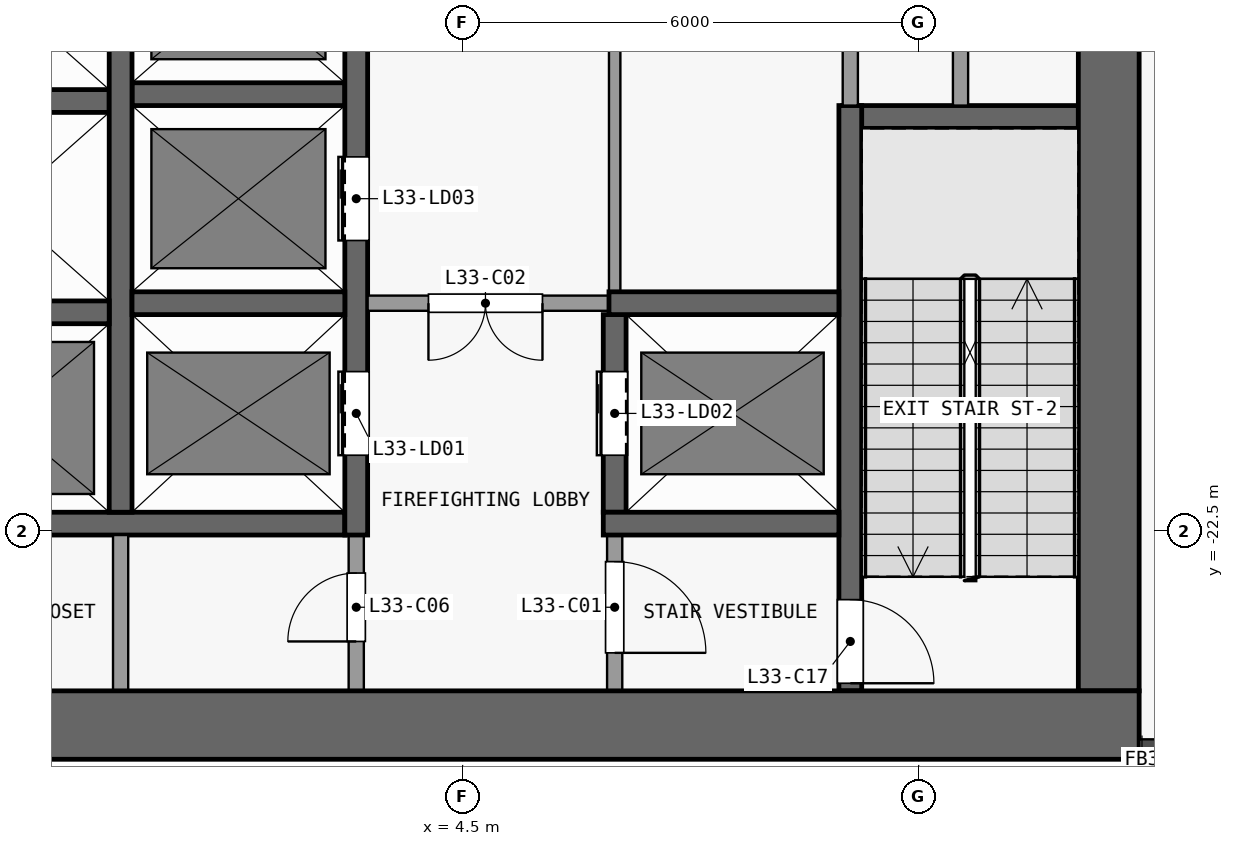
"""IFC4 building model, lengths in metres.
Left out: names, types, materials, properties, quantities, classifications, styles, units other than length and angle.
Written with IfcOpenShell. Run it as: python <this file> out.ifc"""

import sys

from ifc_helpers import new_model, si_unit, direction, frame, frame_2d, origin, place, context, subcontext, project, spatial, rectangle, extrude, element, fill, save


model = new_model("IFC4")
c1 = context("Model", 3, precision=1e-05, world=origin(), true_north=direction((0.0, 1.0)))
c2 = subcontext(c1, "Body", "Model", "MODEL_VIEW")
j1 = project(units=[si_unit("LENGTHUNIT", "METRE"), si_unit("PLANEANGLEUNIT", "RADIAN")], contexts=[c1])
p1 = place(None, origin())
s1 = spatial("IfcSite", under=j1, at=p1, CompositionType="ELEMENT")
p2 = place(p1, origin())
s2 = spatial("IfcBuilding", under=s1, at=p2, CompositionType="ELEMENT")
p3 = place(p2, frame((0.0, 0.0, 133.9)))
s3 = spatial("IfcBuildingStorey", under=s2, at=p3, CompositionType="ELEMENT", Elevation=133.9)
p4 = place(p3, frame((-13.4, -25.05, 0.0), z_axis=(0.0, 0.0, 1.0), x_axis=(1.0, 0.0, 0.0)))
e1 = element("IfcWall", 1, at=p4, inside=s3, PredefinedType="SHEAR", context=c2, shape_type="SweptSolid", body=[
    extrude(rectangle(XDim=26.8, YDim=0.9, at=frame_2d((13.4, 0.0))), origin(), (0.0, 0.0, 1.0), 4.7),
])
p5 = place(p3, frame((13.0, -24.6, 0.0), z_axis=(0.0, 0.0, 1.0), x_axis=(0.0, 1.0, 0.0)))
e2 = element("IfcWall", 2, at=p5, inside=s3, PredefinedType="SHEAR", context=c2, shape_type="SweptSolid", body=[
    extrude(rectangle(XDim=16.1, YDim=0.8, at=frame_2d((8.05, 0.0))), origin(), (0.0, 0.0, 1.0), 4.7),
])
p6 = place(p3, frame((-2.95, -22.4, 0.0), z_axis=(0.0, 0.0, 1.0), x_axis=(1.0, 0.0, 0.0)))
e3 = element("IfcWall", 3, at=p6, inside=s3, PredefinedType="SHEAR", context=c2, shape_type="SweptSolid", body=[
    extrude(rectangle(XDim=5.9, YDim=0.3, at=frame_2d((2.95, 0.0))), origin(), (0.0, 0.0, 1.0), 4.7),
])
p7 = place(p3, frame((6.35, -22.4, 0.0), z_axis=(0.0, 0.0, 1.0), x_axis=(1.0, 0.0, 0.0)))
e4 = element("IfcWall", 4, at=p7, inside=s3, PredefinedType="SHEAR", context=c2, shape_type="SweptSolid", body=[
    extrude(rectangle(XDim=3.1, YDim=0.3, at=frame_2d((1.55, 0.0))), origin(), (0.0, 0.0, 1.0), 4.7),
])
for number, where, z_axis, x_axis in (
    (5, (-2.95, -19.62, 0.0), (0.0, 0.0, 1.0), (1.0, 0.0, 0.0)),
    (6, (0.15, -19.5, 0.0), (0.0, 0.0, 1.0), (1.0, 0.0, 0.0)),
):
    element("IfcWall", number, at=place(p3, frame(where, z_axis=z_axis, x_axis=x_axis)), inside=s3, PredefinedType="SHEAR", context=c2, shape_type="SweptSolid", body=[
        extrude(rectangle(XDim=2.8, YDim=0.3, at=frame_2d((1.4, 0.0))), origin(), (0.0, 0.0, 1.0), 4.7),
    ])
p8 = place(p3, frame((6.575, -19.5, 0.0), z_axis=(0.0, 0.0, 1.0), x_axis=(-1.0, 0.0, 0.0)))
e7 = element("IfcWall", 7, at=p8, inside=s3, PredefinedType="PARTITIONING", context=c2, shape_type="SweptSolid", body=[
    extrude(rectangle(XDim=3.325, YDim=0.2, at=frame_2d((1.663, 0.0))), origin(), (0.0, 0.0, 1.0), 4.7),
])
p9 = place(p8, frame((1.025, 0.0, 0.0)))
e8 = element("IfcOpeningElement", 8, at=p9, cuts=e7, PredefinedType="OPENING", context=c2, shape_type="SweptSolid", body=[
    extrude(rectangle(XDim=1.5, YDim=2.1, at=frame_2d((0.75, 1.05))), frame((0.0, 0.11, 0.0), z_axis=(0.0, -1.0, 0.0), x_axis=(1.0, 0.0, 0.0)), (0.0, 0.0, 1.0), 0.22),
])
p10 = place(p3, frame((6.425, -19.5, 0.0), z_axis=(0.0, 0.0, 1.0), x_axis=(1.0, 0.0, 0.0)))
e9 = element("IfcWall", 9, at=p10, inside=s3, PredefinedType="SHEAR", context=c2, shape_type="SweptSolid", body=[
    extrude(rectangle(XDim=3.025, YDim=0.3, at=frame_2d((1.512, 0.0))), origin(), (0.0, 0.0, 1.0), 4.7),
])
p11 = place(p3, frame((9.5, -17.05, 0.0), z_axis=(0.0, 0.0, 1.0), x_axis=(1.0, 0.0, 0.0)))
e10 = element("IfcWall", 10, at=p11, inside=s3, PredefinedType="SHEAR", context=c2, shape_type="SweptSolid", body=[
    extrude(rectangle(XDim=3.1, YDim=0.3, at=frame_2d((1.55, 0.0))), origin(), (0.0, 0.0, 1.0), 4.7),
])
for number, where, z_axis, x_axis in (
    (11, (-2.95, -16.84, 0.0), (0.0, 0.0, 1.0), (1.0, 0.0, 0.0)),
    (12, (0.15, -16.75, 0.0), (0.0, 0.0, 1.0), (1.0, 0.0, 0.0)),
):
    element("IfcWall", number, at=place(p3, frame(where, z_axis=z_axis, x_axis=x_axis)), inside=s3, PredefinedType="SHEAR", context=c2, shape_type="SweptSolid", body=[
        extrude(rectangle(XDim=2.8, YDim=0.3, at=frame_2d((1.4, 0.0))), origin(), (0.0, 0.0, 1.0), 4.7),
    ])
p12 = place(p3, frame((0.0, -24.6, 0.0), z_axis=(0.0, 0.0, 1.0), x_axis=(0.0, 1.0, 0.0)))
e13 = element("IfcWall", 13, at=p12, inside=s3, PredefinedType="PARTITIONING", context=c2, shape_type="SweptSolid", body=[
    extrude(rectangle(XDim=2.05, YDim=0.2, at=frame_2d((1.025, 0.0))), origin(), (0.0, 0.0, 1.0), 4.7),
])
p13 = place(p3, frame((0.0, -22.25, 0.0), z_axis=(0.0, 0.0, 1.0), x_axis=(0.0, 1.0, 0.0)))
e14 = element("IfcWall", 14, at=p13, inside=s3, PredefinedType="SHEAR", context=c2, shape_type="SweptSolid", body=[
    extrude(rectangle(XDim=13.75, YDim=0.3, at=frame_2d((6.875, 0.0))), origin(), (0.0, 0.0, 1.0), 4.7),
])
p14 = place(p3, frame((3.1, -24.6, 0.0), z_axis=(0.0, 0.0, 1.0), x_axis=(0.0, 1.0, 0.0)))
e15 = element("IfcWall", 15, at=p14, inside=s3, PredefinedType="PARTITIONING", context=c2, shape_type="SweptSolid", body=[
    extrude(rectangle(XDim=2.05, YDim=0.2, at=frame_2d((1.025, 0.0))), origin(), (0.0, 0.0, 1.0), 4.7),
])
p15 = place(p14, frame((0.65, 0.0, 0.0)))
e16 = element("IfcOpeningElement", 16, at=p15, cuts=e15, PredefinedType="OPENING", context=c2, shape_type="SweptSolid", body=[
    extrude(rectangle(XDim=0.9, YDim=2.1, at=frame_2d((0.45, 1.05))), frame((0.0, 0.11, 0.0), z_axis=(0.0, -1.0, 0.0), x_axis=(1.0, 0.0, 0.0)), (0.0, 0.0, 1.0), 0.22),
])
p16 = place(p3, frame((3.1, -22.55, 0.0), z_axis=(0.0, 0.0, 1.0), x_axis=(0.0, 1.0, 0.0)))
e17 = element("IfcWall", 17, at=p16, inside=s3, PredefinedType="SHEAR", context=c2, shape_type="SweptSolid", body=[
    extrude(rectangle(XDim=14.05, YDim=0.3, at=frame_2d((7.025, 0.0))), origin(), (0.0, 0.0, 1.0), 4.7),
])
p17 = place(p16, frame((1.05, 0.0, 0.0)))
e18 = element("IfcOpeningElement", 18, at=p17, cuts=e17, PredefinedType="OPENING", context=c2, shape_type="SweptSolid", body=[
    extrude(rectangle(XDim=1.1, YDim=2.1, at=frame_2d((0.55, 1.05))), frame((0.0, 0.16, 0.0), z_axis=(0.0, -1.0, 0.0), x_axis=(1.0, 0.0, 0.0)), (0.0, 0.0, 1.0), 0.32),
])
p18 = place(p16, frame((3.875, 0.0, 0.0)))
e19 = element("IfcOpeningElement", 19, at=p18, cuts=e17, PredefinedType="OPENING", context=c2, shape_type="SweptSolid", body=[
    extrude(rectangle(XDim=1.1, YDim=2.1, at=frame_2d((0.55, 1.05))), frame((0.0, 0.16, 0.0), z_axis=(0.0, -1.0, 0.0), x_axis=(1.0, 0.0, 0.0)), (0.0, 0.0, 1.0), 0.32),
])
p19 = place(p16, frame((6.625, 0.0, 0.0)))
e20 = element("IfcOpeningElement", 20, at=p19, cuts=e17, PredefinedType="OPENING", context=c2, shape_type="SweptSolid", body=[
    extrude(rectangle(XDim=1.1, YDim=2.1, at=frame_2d((0.55, 1.05))), frame((0.0, 0.16, 0.0), z_axis=(0.0, -1.0, 0.0), x_axis=(1.0, 0.0, 0.0)), (0.0, 0.0, 1.0), 0.32),
])
p20 = place(p16, frame((9.375, 0.0, 0.0)))
e21 = element("IfcOpeningElement", 21, at=p20, cuts=e17, PredefinedType="OPENING", context=c2, shape_type="SweptSolid", body=[
    extrude(rectangle(XDim=1.1, YDim=2.1, at=frame_2d((0.55, 1.05))), frame((0.0, 0.16, 0.0), z_axis=(0.0, -1.0, 0.0), x_axis=(1.0, 0.0, 0.0)), (0.0, 0.0, 1.0), 0.32),
])
p21 = place(p16, frame((12.125, 0.0, 0.0)))
e22 = element("IfcOpeningElement", 22, at=p21, cuts=e17, PredefinedType="OPENING", context=c2, shape_type="SweptSolid", body=[
    extrude(rectangle(XDim=1.1, YDim=2.1, at=frame_2d((0.55, 1.05))), frame((0.0, 0.16, 0.0), z_axis=(0.0, -1.0, 0.0), x_axis=(1.0, 0.0, 0.0)), (0.0, 0.0, 1.0), 0.32),
])
p22 = place(p3, frame((6.5, -22.55, 0.0), z_axis=(0.0, 0.0, 1.0), x_axis=(0.0, -1.0, 0.0)))
e23 = element("IfcWall", 23, at=p22, inside=s3, PredefinedType="PARTITIONING", context=c2, shape_type="SweptSolid", body=[
    extrude(rectangle(XDim=2.05, YDim=0.2, at=frame_2d((1.025, 0.0))), origin(), (0.0, 0.0, 1.0), 4.7),
])
p23 = place(p22, frame((0.35, 0.0, 0.0)))
e24 = element("IfcOpeningElement", 24, at=p23, cuts=e23, PredefinedType="OPENING", context=c2, shape_type="SweptSolid", body=[
    extrude(rectangle(XDim=1.2, YDim=2.1, at=frame_2d((0.6, 1.05))), frame((0.0, 0.11, 0.0), z_axis=(0.0, -1.0, 0.0), x_axis=(1.0, 0.0, 0.0)), (0.0, 0.0, 1.0), 0.22),
])
p24 = place(p3, frame((6.5, -22.25, 0.0), z_axis=(0.0, 0.0, 1.0), x_axis=(0.0, 1.0, 0.0)))
e25 = element("IfcWall", 25, at=p24, inside=s3, PredefinedType="SHEAR", context=c2, shape_type="SweptSolid", body=[
    extrude(rectangle(XDim=2.6, YDim=0.3, at=frame_2d((1.3, 0.0))), origin(), (0.0, 0.0, 1.0), 4.7),
])
p25 = place(p24, frame((0.75, 0.0, 0.0)))
e26 = element("IfcOpeningElement", 26, at=p25, cuts=e25, PredefinedType="OPENING", context=c2, shape_type="SweptSolid", body=[
    extrude(rectangle(XDim=1.1, YDim=2.1, at=frame_2d((0.55, 1.05))), frame((0.0, 0.16, 0.0), z_axis=(0.0, -1.0, 0.0), x_axis=(1.0, 0.0, 0.0)), (0.0, 0.0, 1.0), 0.32),
])
p26 = place(p3, frame((6.5, -8.5, 0.0), z_axis=(0.0, 0.0, 1.0), x_axis=(0.0, -1.0, 0.0)))
e27 = element("IfcWall", 27, at=p26, inside=s3, PredefinedType="PARTITIONING", context=c2, shape_type="SweptSolid", body=[
    extrude(rectangle(XDim=10.85, YDim=0.15, at=frame_2d((5.425, 0.0))), origin(), (0.0, 0.0, 1.0), 4.7),
])
p27 = place(p26, frame((6.275, 0.0, 0.0)))
e28 = element("IfcOpeningElement", 28, at=p27, cuts=e27, PredefinedType="OPENING", context=c2, shape_type="SweptSolid", body=[
    extrude(rectangle(XDim=1.2, YDim=2.1, at=frame_2d((0.6, 1.05))), frame((0.0, 0.085, 0.0), z_axis=(0.0, -1.0, 0.0), x_axis=(1.0, 0.0, 0.0)), (0.0, 0.0, 1.0), 0.17),
])
p28 = place(p26, frame((0.925, 0.0, 0.0)))
e29 = element("IfcOpeningElement", 29, at=p28, cuts=e27, PredefinedType="OPENING", context=c2, shape_type="SweptSolid", body=[
    extrude(rectangle(XDim=0.9, YDim=2.1, at=frame_2d((0.45, 1.05))), frame((0.0, 0.085, 0.0), z_axis=(0.0, -1.0, 0.0), x_axis=(1.0, 0.0, 0.0)), (0.0, 0.0, 1.0), 0.17),
])
p29 = place(p3, frame((9.6, -16.9, 0.0), z_axis=(0.0, 0.0, 1.0), x_axis=(0.0, -1.0, 0.0)))
e30 = element("IfcWall", 30, at=p29, inside=s3, PredefinedType="SHEAR", context=c2, shape_type="SweptSolid", body=[
    extrude(rectangle(XDim=7.7, YDim=0.3, at=frame_2d((3.85, 0.0))), origin(), (0.0, 0.0, 1.0), 4.7),
])
p30 = place(p29, frame((6.5, 0.0, 0.0)))
e31 = element("IfcOpeningElement", 31, at=p30, cuts=e30, PredefinedType="OPENING", context=c2, shape_type="SweptSolid", body=[
    extrude(rectangle(XDim=1.1, YDim=2.1, at=frame_2d((0.55, 1.05))), frame((0.0, 0.16, 0.0), z_axis=(0.0, -1.0, 0.0), x_axis=(1.0, 0.0, 0.0)), (0.0, 0.0, 1.0), 0.32),
])
p31 = place(p3, frame((9.6, -16.9, 0.0), z_axis=(0.0, 0.0, 1.0), x_axis=(0.0, 1.0, 0.0)))
e32 = element("IfcWall", 32, at=p31, inside=s3, PredefinedType="PARTITIONING", context=c2, shape_type="SweptSolid", body=[
    extrude(rectangle(XDim=8.4, YDim=0.2, at=frame_2d((4.2, 0.0))), origin(), (0.0, 0.0, 1.0), 4.7),
])
p32 = place(p3, frame((11.05, -11.2, 0.0), z_axis=(0.0, 0.0, 1.0), x_axis=(0.0, -1.0, 0.0)))
e33 = element("IfcWall", 33, at=p32, inside=s3, PredefinedType="PARTITIONING", context=c2, shape_type="SweptSolid", body=[
    extrude(rectangle(XDim=5.7, YDim=0.2, at=frame_2d((2.85, 0.0))), origin(), (0.0, 0.0, 1.0), 4.7),
])
p33 = place(p32, frame((2.525, 0.0, 0.0)))
e34 = element("IfcOpeningElement", 34, at=p33, cuts=e33, PredefinedType="OPENING", context=c2, shape_type="SweptSolid", body=[
    extrude(rectangle(XDim=0.9, YDim=2.1, at=frame_2d((0.45, 1.05))), frame((0.0, 0.11, 0.0), z_axis=(0.0, -1.0, 0.0), x_axis=(1.0, 0.0, 0.0)), (0.0, 0.0, 1.0), 0.22),
])
p34 = place(p17, origin())
e35 = element("IfcDoor", 35, at=p34, inside=s3, OperationType="DOUBLE_DOOR_SLIDING", PredefinedType="DOOR", context=c2, shape_type="SweptSolid", body=[
    extrude(rectangle(XDim=1.1, YDim=2.1, at=frame_2d((0.55, 1.05))), frame((0.0, 0.025, 0.0), z_axis=(0.0, -1.0, 0.0), x_axis=(1.0, 0.0, 0.0)), (0.0, 0.0, 1.0), 0.05),
])
fill(e18, e35)
p35 = place(p25, origin())
e36 = element("IfcDoor", 36, at=p35, inside=s3, OperationType="DOUBLE_DOOR_SLIDING", PredefinedType="DOOR", context=c2, shape_type="SweptSolid", body=[
    extrude(rectangle(XDim=1.1, YDim=2.1, at=frame_2d((0.55, 1.05))), frame((0.0, 0.025, 0.0), z_axis=(0.0, -1.0, 0.0), x_axis=(1.0, 0.0, 0.0)), (0.0, 0.0, 1.0), 0.05),
])
fill(e26, e36)
p36 = place(p18, origin())
e37 = element("IfcDoor", 37, at=p36, inside=s3, OperationType="DOUBLE_DOOR_SLIDING", PredefinedType="DOOR", context=c2, shape_type="SweptSolid", body=[
    extrude(rectangle(XDim=1.1, YDim=2.1, at=frame_2d((0.55, 1.05))), frame((0.0, 0.025, 0.0), z_axis=(0.0, -1.0, 0.0), x_axis=(1.0, 0.0, 0.0)), (0.0, 0.0, 1.0), 0.05),
])
fill(e19, e37)
p37 = place(p23, origin())
e38 = element("IfcDoor", 38, at=p37, inside=s3, OperationType="SINGLE_SWING_RIGHT", PredefinedType="DOOR", context=c2, shape_type="SweptSolid", body=[
    extrude(rectangle(XDim=1.2, YDim=2.1, at=frame_2d((0.6, 1.05))), frame((0.0, 0.025, 0.0), z_axis=(0.0, -1.0, 0.0), x_axis=(1.0, 0.0, 0.0)), (0.0, 0.0, 1.0), 0.05),
])
fill(e24, e38)
p38 = place(p9, origin())
e39 = element("IfcDoor", 39, at=p38, inside=s3, OperationType="DOUBLE_DOOR_SINGLE_SWING", PredefinedType="DOOR", context=c2, shape_type="SweptSolid", body=[
    extrude(rectangle(XDim=1.5, YDim=2.1, at=frame_2d((0.75, 1.05))), frame((0.0, 0.025, 0.0), z_axis=(0.0, -1.0, 0.0), x_axis=(1.0, 0.0, 0.0)), (0.0, 0.0, 1.0), 0.05),
])
fill(e8, e39)
p39 = place(p15, origin())
e40 = element("IfcDoor", 40, at=p39, inside=s3, OperationType="SINGLE_SWING_LEFT", PredefinedType="DOOR", context=c2, shape_type="SweptSolid", body=[
    extrude(rectangle(XDim=0.9, YDim=2.1, at=frame_2d((0.45, 1.05))), frame((0.0, 0.025, 0.0), z_axis=(0.0, -1.0, 0.0), x_axis=(1.0, 0.0, 0.0)), (0.0, 0.0, 1.0), 0.05),
])
fill(e16, e40)
p40 = place(p30, origin())
e41 = element("IfcDoor", 41, at=p40, inside=s3, OperationType="SINGLE_SWING_RIGHT", PredefinedType="DOOR", context=c2, shape_type="SweptSolid", body=[
    extrude(rectangle(XDim=1.1, YDim=2.1, at=frame_2d((0.55, 1.05))), frame((0.0, 0.025, 0.0), z_axis=(0.0, -1.0, 0.0), x_axis=(1.0, 0.0, 0.0)), (0.0, 0.0, 1.0), 0.05),
])
fill(e31, e41)
save(model, sys.argv[1])
